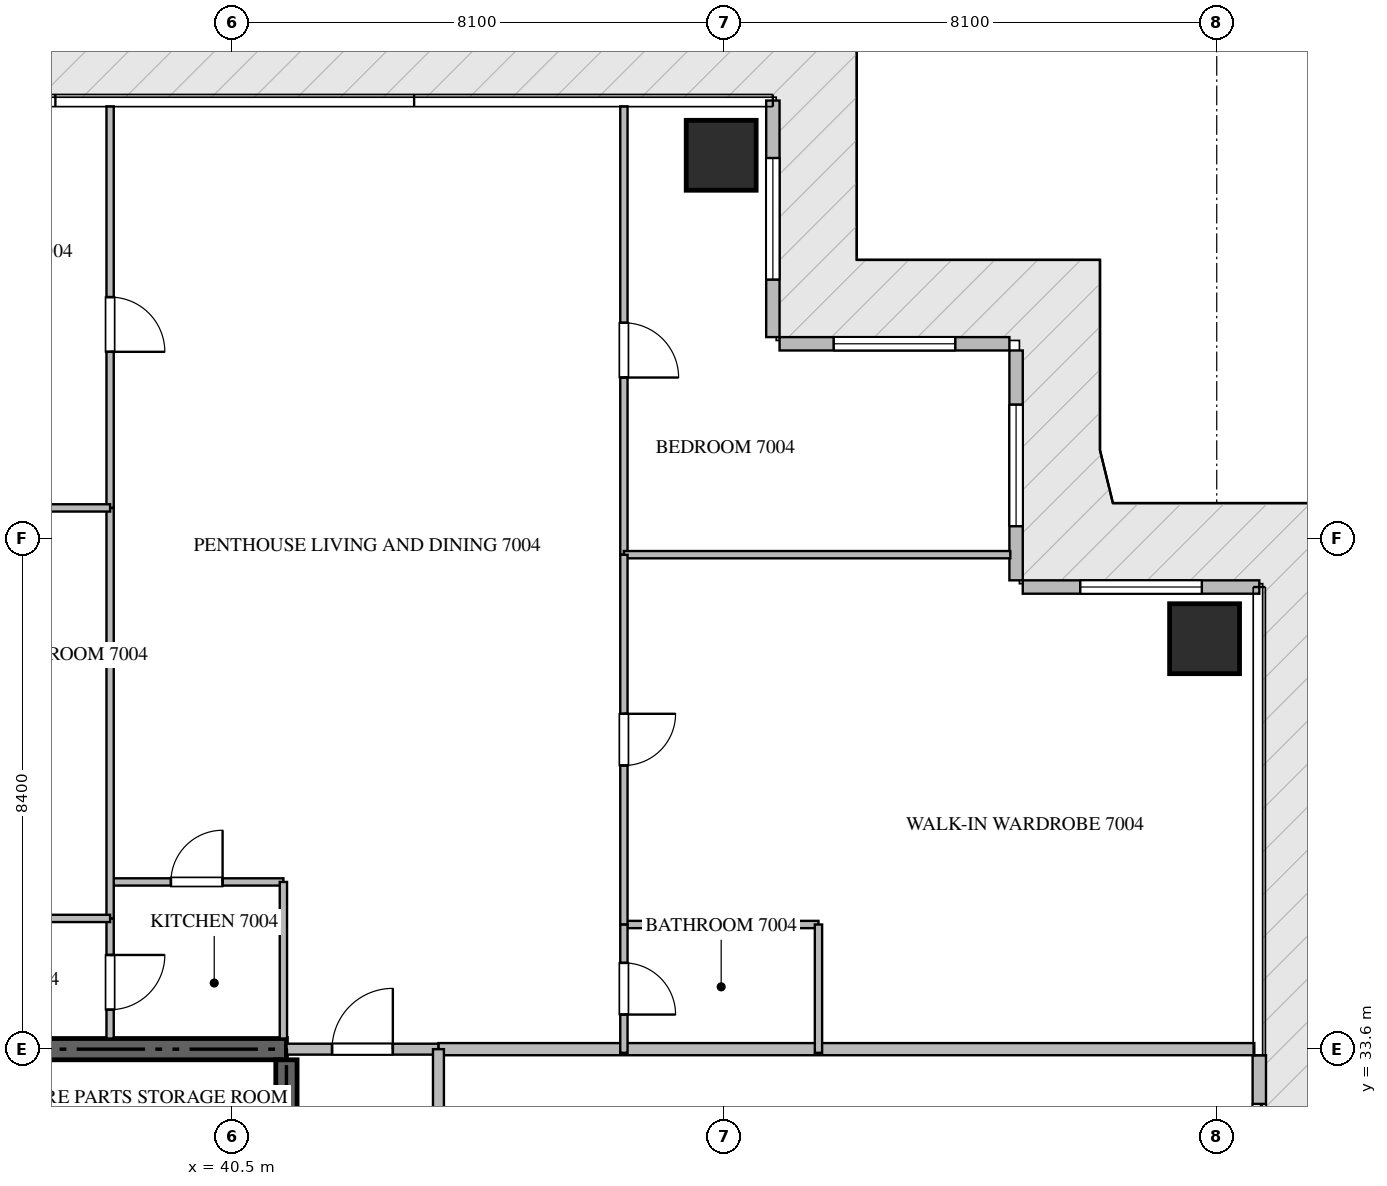
"""IFC4 building model, lengths in metres.
Left out: names, types, materials, properties, quantities, classifications, styles, units other than length and angle.
Written with IfcOpenShell. Run it as: python <this file> out.ifc"""

import sys

from ifc_helpers import new_model, si_unit, direction, frame, frame_2d, origin, origin_2d, place, context, subcontext, project, spatial, rectangle, extrude, source, transform, mapped, element, fill, save


model = new_model("IFC4")
c1 = context("Model", 3, precision=1e-05, world=origin(), true_north=direction((0.0, 1.0)))
c2 = subcontext(c1, "Body", "Model", "MODEL_VIEW")
j1 = project(units=[si_unit("LENGTHUNIT", "METRE"), si_unit("PLANEANGLEUNIT", "RADIAN")], contexts=[c1])
p1 = place(None, origin())
s1 = spatial("IfcSite", under=j1, at=p1, CompositionType="ELEMENT")
p2 = place(p1, origin())
s2 = spatial("IfcBuilding", under=s1, at=p2, CompositionType="ELEMENT")
p3 = place(p2, frame((0.0, 0.0, 279.75)))
s3 = spatial("IfcBuildingStorey", under=s2, at=p3, CompositionType="ELEMENT", Elevation=279.75)
p4 = place(p3, frame((41.4, 33.6, -0.26), z_axis=(0.0, 0.0, 1.0), x_axis=(-1.0, 0.0, 0.0)))
e1 = element("IfcWall", 1, at=p4, inside=s3, PredefinedType="SHEAR", context=c2, shape_type="SweptSolid", body=[
    extrude(rectangle(XDim=18.0, YDim=0.35, at=frame_2d((9.0, 0.0))), origin(), (0.0, 0.0, 1.0), 3.848),
])
p5 = place(p3, frame((41.4, 27.75, -0.26), z_axis=(0.0, 0.0, 1.0), x_axis=(0.0, 1.0, 0.0)))
e2 = element("IfcWall", 2, at=p5, inside=s3, PredefinedType="SHEAR", context=c2, shape_type="SweptSolid", body=[
    extrude(rectangle(XDim=5.675, YDim=0.35, at=frame_2d((2.837, 0.0))), origin(), (0.0, 0.0, 1.0), 3.848),
])
m1 = source(origin(), c2, "Body", "SweptSolid", [
    extrude(rectangle(XDim=1.15, YDim=1.15, at=origin_2d()), origin(), (0.0, 0.0, 1.0), 3.85),
])
for number, where, z_axis, x_axis in (
    (3, (48.55, 48.3, -0.26), (0.0, 0.0, 1.0), (1.0, 0.0, 0.0)),
    (4, (56.5, 40.35, -0.26), (0.0, 0.0, 1.0), (1.0, 0.0, 0.0)),
):
    element("IfcColumn", number, at=place(p3, frame(where, z_axis=z_axis, x_axis=x_axis)), inside=s3, PredefinedType="COLUMN", context=c2, shape_type="MappedRepresentation", body=[
        mapped(m1, transform((0.0, 0.0, 0.0), scale=1.0)),
    ])
p6 = place(p3, frame((57.4, 30.5, 0.0), z_axis=(0.0, 0.0, 1.0), x_axis=(0.0, 1.0, 0.0)))
e5 = element("IfcWall", 5, at=p6, inside=s3, PredefinedType="ELEMENTEDWALL", context=c2, shape_type="SweptSolid", body=[
    extrude(rectangle(XDim=3.0, YDim=0.22, at=frame_2d((1.5, 0.0))), origin(), (0.0, 0.0, 1.0), 3.575),
])
p7 = place(p6, frame((0.8, 0.0, 0.0)))
e6 = element("IfcOpeningElement", 6, at=p7, cuts=e5, PredefinedType="OPENING", context=c2, shape_type="SweptSolid", body=[
    extrude(rectangle(XDim=1.4, YDim=2.25, at=frame_2d((0.7, 1.125))), frame((0.0, 0.12, 0.0), z_axis=(0.0, -1.0, 0.0), x_axis=(1.0, 0.0, 0.0)), (0.0, 0.0, 1.0), 0.24),
])
p8 = place(p3, frame((57.4, 41.2, 0.0), z_axis=(0.0, 0.0, 1.0), x_axis=(-1.0, 0.0, 0.0)))
e7 = element("IfcWall", 7, at=p8, inside=s3, PredefinedType="ELEMENTEDWALL", context=c2, shape_type="SweptSolid", body=[
    extrude(rectangle(XDim=3.89, YDim=0.22, at=frame_2d((1.945, 0.0))), origin(), (0.0, 0.0, 1.0), 3.575),
])
p9 = place(p8, frame((0.945, 0.0, 0.65)))
e8 = element("IfcOpeningElement", 8, at=p9, cuts=e7, PredefinedType="OPENING", context=c2, shape_type="SweptSolid", body=[
    extrude(rectangle(XDim=2.0, YDim=2.2, at=frame_2d((1.0, 1.1))), frame((0.0, 0.12, 0.0), z_axis=(0.0, -1.0, 0.0), x_axis=(1.0, 0.0, 0.0)), (0.0, 0.0, 1.0), 0.24),
])
p10 = place(p3, frame((53.4, 41.31, 0.0), z_axis=(0.0, 0.0, 1.0), x_axis=(0.0, 1.0, 0.0)))
e9 = element("IfcWall", 9, at=p10, inside=s3, PredefinedType="ELEMENTEDWALL", context=c2, shape_type="SweptSolid", body=[
    extrude(rectangle(XDim=3.78, YDim=0.22, at=frame_2d((1.89, 0.0))), origin(), (0.0, 0.0, 1.0), 3.575),
])
p11 = place(p10, frame((0.89, 0.0, 0.65)))
e10 = element("IfcOpeningElement", 10, at=p11, cuts=e9, PredefinedType="OPENING", context=c2, shape_type="SweptSolid", body=[
    extrude(rectangle(XDim=2.0, YDim=2.2, at=frame_2d((1.0, 1.1))), frame((0.0, 0.12, 0.0), z_axis=(0.0, -1.0, 0.0), x_axis=(1.0, 0.0, 0.0)), (0.0, 0.0, 1.0), 0.24),
])
p12 = place(p3, frame((53.29, 45.2, 0.0), z_axis=(0.0, 0.0, 1.0), x_axis=(-1.0, 0.0, 0.0)))
e11 = element("IfcWall", 11, at=p12, inside=s3, PredefinedType="ELEMENTEDWALL", context=c2, shape_type="SweptSolid", body=[
    extrude(rectangle(XDim=3.78, YDim=0.22, at=frame_2d((1.89, 0.0))), origin(), (0.0, 0.0, 1.0), 3.575),
])
p13 = place(p12, frame((0.89, 0.0, 0.65)))
e12 = element("IfcOpeningElement", 12, at=p13, cuts=e11, PredefinedType="OPENING", context=c2, shape_type="SweptSolid", body=[
    extrude(rectangle(XDim=2.0, YDim=2.2, at=frame_2d((1.0, 1.1))), frame((0.0, 0.12, 0.0), z_axis=(0.0, -1.0, 0.0), x_axis=(1.0, 0.0, 0.0)), (0.0, 0.0, 1.0), 0.24),
])
p14 = place(p3, frame((49.4, 45.31, 0.0), z_axis=(0.0, 0.0, 1.0), x_axis=(0.0, 1.0, 0.0)))
e13 = element("IfcWall", 13, at=p14, inside=s3, PredefinedType="ELEMENTEDWALL", context=c2, shape_type="SweptSolid", body=[
    extrude(rectangle(XDim=3.89, YDim=0.22, at=frame_2d((1.945, 0.0))), origin(), (0.0, 0.0, 1.0), 3.575),
])
p15 = place(p14, frame((0.945, 0.0, 0.65)))
e14 = element("IfcOpeningElement", 14, at=p15, cuts=e13, PredefinedType="OPENING", context=c2, shape_type="SweptSolid", body=[
    extrude(rectangle(XDim=2.0, YDim=2.2, at=frame_2d((1.0, 1.1))), frame((0.0, 0.12, 0.0), z_axis=(0.0, -1.0, 0.0), x_axis=(1.0, 0.0, 0.0)), (0.0, 0.0, 1.0), 0.24),
])
p16 = place(p3, frame((43.9, 33.6, 0.0), z_axis=(0.0, 0.0, 1.0), x_axis=(1.0, 0.0, 0.0)))
e15 = element("IfcWall", 15, at=p16, inside=s3, PredefinedType="PARTITIONING", context=c2, shape_type="SweptSolid", body=[
    extrude(rectangle(XDim=13.418, YDim=0.2, at=frame_2d((6.709, 0.0))), origin(), (0.0, 0.0, 1.0), 3.59),
])
p17 = place(p3, frame((41.402, 33.6, 0.0), z_axis=(0.0, 0.0, 1.0), x_axis=(1.0, 0.0, 0.0)))
e16 = element("IfcWall", 16, at=p17, inside=s3, PredefinedType="PARTITIONING", context=c2, shape_type="SweptSolid", body=[
    extrude(rectangle(XDim=2.496, YDim=0.18, at=frame_2d((1.248, 0.0))), origin(), (0.0, 0.0, 1.0), 3.59),
])
p18 = place(p17, frame((0.748, 0.0, 0.0)))
e17 = element("IfcOpeningElement", 17, at=p18, cuts=e16, PredefinedType="OPENING", context=c2, shape_type="SweptSolid", body=[
    extrude(rectangle(XDim=1.0, YDim=2.15, at=frame_2d((0.5, 1.075))), frame((0.0, 0.1, 0.0), z_axis=(0.0, -1.0, 0.0), x_axis=(1.0, 0.0, 0.0)), (0.0, 0.0, 1.0), 0.2),
])
p19 = place(p3, frame((43.9, 16.8, 0.0), z_axis=(0.0, 0.0, 1.0), x_axis=(0.0, 1.0, 0.0)))
e18 = element("IfcWall", 18, at=p19, inside=s3, PredefinedType="PARTITIONING", context=c2, shape_type="SweptSolid", body=[
    extrude(rectangle(XDim=16.8, YDim=0.18, at=frame_2d((8.4, 0.0))), origin(), (0.0, 0.0, 1.0), 3.59),
])
p20 = place(p19, frame((4.898, 0.0, 0.0)))
e19 = element("IfcOpeningElement", 19, at=p20, cuts=e18, PredefinedType="OPENING", context=c2, shape_type="SweptSolid", body=[
    extrude(rectangle(XDim=1.0, YDim=2.15, at=frame_2d((0.5, 1.075))), frame((0.0, 0.1, 0.0), z_axis=(0.0, -1.0, 0.0), x_axis=(1.0, 0.0, 0.0)), (0.0, 0.0, 1.0), 0.2),
])
p21 = place(p19, frame((13.335, 0.0, 0.0)))
e20 = element("IfcOpeningElement", 20, at=p21, cuts=e18, PredefinedType="OPENING", context=c2, shape_type="SweptSolid", body=[
    extrude(rectangle(XDim=1.0, YDim=2.15, at=frame_2d((0.5, 1.075))), frame((0.0, 0.1, 0.0), z_axis=(0.0, -1.0, 0.0), x_axis=(1.0, 0.0, 0.0)), (0.0, 0.0, 1.0), 0.2),
])
p22 = place(p3, frame((38.5, 36.35, 0.0), z_axis=(0.0, 0.0, 1.0), x_axis=(1.0, 0.0, 0.0)))
e21 = element("IfcWall", 21, at=p22, inside=s3, PredefinedType="PARTITIONING", context=c2, shape_type="SweptSolid", body=[
    extrude(rectangle(XDim=2.85, YDim=0.12, at=frame_2d((1.425, 0.0))), origin(), (0.0, 0.0, 1.0), 3.59),
])
p23 = place(p22, frame((1.0, 0.0, 0.0)))
e22 = element("IfcOpeningElement", 22, at=p23, cuts=e21, PredefinedType="OPENING", context=c2, shape_type="SweptSolid", body=[
    extrude(rectangle(XDim=0.85, YDim=2.1, at=frame_2d((0.425, 1.05))), frame((0.0, 0.07, 0.0), z_axis=(0.0, -1.0, 0.0), x_axis=(1.0, 0.0, 0.0)), (0.0, 0.0, 1.0), 0.14),
])
p24 = place(p3, frame((41.35, 36.35, 0.0), z_axis=(0.0, 0.0, 1.0), x_axis=(0.0, -1.0, 0.0)))
e23 = element("IfcWall", 23, at=p24, inside=s3, PredefinedType="PARTITIONING", context=c2, shape_type="SweptSolid", body=[
    extrude(rectangle(XDim=2.575, YDim=0.12, at=frame_2d((1.288, 0.0))), origin(), (0.0, 0.0, 1.0), 3.59),
])
p25 = place(p3, frame((38.5, 35.75, 0.0), z_axis=(0.0, 0.0, 1.0), x_axis=(0.0, -1.0, 0.0)))
e24 = element("IfcWall", 24, at=p25, inside=s3, PredefinedType="PARTITIONING", context=c2, shape_type="SweptSolid", body=[
    extrude(rectangle(XDim=1.975, YDim=0.12, at=frame_2d((0.988, 0.0))), origin(), (0.0, 0.0, 1.0), 3.59),
])
p26 = place(p25, frame((0.601, 0.0, 0.0)))
e25 = element("IfcOpeningElement", 25, at=p26, cuts=e24, PredefinedType="OPENING", context=c2, shape_type="SweptSolid", body=[
    extrude(rectangle(XDim=0.9, YDim=2.1, at=frame_2d((0.45, 1.05))), frame((0.0, 0.07, 0.0), z_axis=(0.0, -1.0, 0.0), x_axis=(1.0, 0.0, 0.0)), (0.0, 0.0, 1.0), 0.14),
])
p27 = place(p3, frame((38.5, 49.105, 0.0), z_axis=(0.0, 0.0, 1.0), x_axis=(0.0, -1.0, 0.0)))
e26 = element("IfcWall", 26, at=p27, inside=s3, PredefinedType="PARTITIONING", context=c2, shape_type="SweptSolid", body=[
    extrude(rectangle(XDim=6.604, YDim=0.12, at=frame_2d((3.302, 0.0))), origin(), (0.0, 0.0, 1.0), 3.59),
])
p28 = place(p27, frame((3.137, 0.0, 0.0)))
e27 = element("IfcOpeningElement", 27, at=p28, cuts=e26, PredefinedType="OPENING", context=c2, shape_type="SweptSolid", body=[
    extrude(rectangle(XDim=0.9, YDim=2.1, at=frame_2d((0.45, 1.05))), frame((0.0, 0.07, 0.0), z_axis=(0.0, -1.0, 0.0), x_axis=(1.0, 0.0, 0.0)), (0.0, 0.0, 1.0), 0.14),
])
p29 = place(p3, frame((38.5, 42.499, 0.0), z_axis=(0.0, 0.0, 1.0), x_axis=(0.0, -1.0, 0.0)))
e28 = element("IfcWall", 28, at=p29, inside=s3, PredefinedType="PARTITIONING", context=c2, shape_type="SweptSolid", body=[
    extrude(rectangle(XDim=6.747, YDim=0.12, at=frame_2d((3.374, 0.0))), origin(), (0.0, 0.0, 1.0), 3.59),
])
p30 = place(p3, frame((33.38, 42.501, 0.0), z_axis=(0.0, 0.0, 1.0), x_axis=(1.0, 0.0, 0.0)))
e29 = element("IfcWall", 29, at=p30, inside=s3, PredefinedType="PARTITIONING", context=c2, shape_type="SweptSolid", body=[
    extrude(rectangle(XDim=5.12, YDim=0.12, at=frame_2d((2.56, 0.0))), origin(), (0.0, 0.0, 1.0), 3.59),
])
p31 = place(p3, frame((35.482, 35.75, 0.0), z_axis=(0.0, 0.0, 1.0), x_axis=(1.0, 0.0, 0.0)))
e30 = element("IfcWall", 30, at=p31, inside=s3, PredefinedType="PARTITIONING", context=c2, shape_type="SweptSolid", body=[
    extrude(rectangle(XDim=3.018, YDim=0.12, at=frame_2d((1.509, 0.0))), origin(), (0.0, 0.0, 1.0), 3.59),
])
p32 = place(p31, frame((1.084, 0.0, 0.0)))
e31 = element("IfcOpeningElement", 31, at=p32, cuts=e30, PredefinedType="OPENING", context=c2, shape_type="SweptSolid", body=[
    extrude(rectangle(XDim=0.85, YDim=2.1, at=frame_2d((0.425, 1.05))), frame((0.0, 0.07, 0.0), z_axis=(0.0, -1.0, 0.0), x_axis=(1.0, 0.0, 0.0)), (0.0, 0.0, 1.0), 0.14),
])
p33 = place(p3, frame((46.95, 49.105, 0.0), z_axis=(0.0, 0.0, 1.0), x_axis=(0.0, -1.0, 0.0)))
e32 = element("IfcWall", 32, at=p33, inside=s3, PredefinedType="PARTITIONING", context=c2, shape_type="SweptSolid", body=[
    extrude(rectangle(XDim=7.373, YDim=0.12, at=frame_2d((3.687, 0.0))), origin(), (0.0, 0.0, 1.0), 3.59),
])
p34 = place(p33, frame((3.56, 0.0, 0.0)))
e33 = element("IfcOpeningElement", 33, at=p34, cuts=e32, PredefinedType="OPENING", context=c2, shape_type="SweptSolid", body=[
    extrude(rectangle(XDim=0.9, YDim=2.1, at=frame_2d((0.45, 1.05))), frame((0.0, 0.07, 0.0), z_axis=(0.0, -1.0, 0.0), x_axis=(1.0, 0.0, 0.0)), (0.0, 0.0, 1.0), 0.14),
])
p35 = place(p3, frame((46.95, 41.732, 0.0), z_axis=(0.0, 0.0, 1.0), x_axis=(1.0, 0.0, 0.0)))
e34 = element("IfcWall", 34, at=p35, inside=s3, PredefinedType="PARTITIONING", context=c2, shape_type="SweptSolid", body=[
    extrude(rectangle(XDim=6.355, YDim=0.12, at=frame_2d((3.177, 0.0))), origin(), (0.0, 0.0, 1.0), 3.59),
])
p36 = place(p3, frame((46.95, 35.65, 0.0), z_axis=(0.0, 0.0, 1.0), x_axis=(1.0, 0.0, 0.0)))
e35 = element("IfcWall", 35, at=p36, inside=s3, PredefinedType="PARTITIONING", context=c2, shape_type="SweptSolid", body=[
    extrude(rectangle(XDim=3.2, YDim=0.12, at=frame_2d((1.6, 0.0))), origin(), (0.0, 0.0, 1.0), 3.59),
])
p37 = place(p3, frame((50.15, 35.65, 0.0), z_axis=(0.0, 0.0, 1.0), x_axis=(0.0, -1.0, 0.0)))
e36 = element("IfcWall", 36, at=p37, inside=s3, PredefinedType="PARTITIONING", context=c2, shape_type="SweptSolid", body=[
    extrude(rectangle(XDim=2.11, YDim=0.12, at=frame_2d((1.055, 0.0))), origin(), (0.0, 0.0, 1.0), 3.59),
])
p38 = place(p3, frame((46.95, 41.73, 0.0), z_axis=(0.0, 0.0, 1.0), x_axis=(0.0, -1.0, 0.0)))
e37 = element("IfcWall", 37, at=p38, inside=s3, PredefinedType="PARTITIONING", context=c2, shape_type="SweptSolid", body=[
    extrude(rectangle(XDim=6.08, YDim=0.12, at=frame_2d((3.04, 0.0))), origin(), (0.0, 0.0, 1.0), 3.59),
])
p39 = place(p38, frame((2.615, 0.0, 0.0)))
e38 = element("IfcOpeningElement", 38, at=p39, cuts=e37, PredefinedType="OPENING", context=c2, shape_type="SweptSolid", body=[
    extrude(rectangle(XDim=0.85, YDim=2.1, at=frame_2d((0.425, 1.05))), frame((0.0, 0.07, 0.0), z_axis=(0.0, -1.0, 0.0), x_axis=(1.0, 0.0, 0.0)), (0.0, 0.0, 1.0), 0.14),
])
p40 = place(p3, frame((46.95, 35.648, 0.0), z_axis=(0.0, 0.0, 1.0), x_axis=(0.0, -1.0, 0.0)))
e39 = element("IfcWall", 39, at=p40, inside=s3, PredefinedType="PARTITIONING", context=c2, shape_type="SweptSolid", body=[
    extrude(rectangle(XDim=2.108, YDim=0.12, at=frame_2d((1.054, 0.0))), origin(), (0.0, 0.0, 1.0), 3.59),
])
p41 = place(p40, frame((0.629, 0.0, 0.0)))
e40 = element("IfcOpeningElement", 40, at=p41, cuts=e39, PredefinedType="OPENING", context=c2, shape_type="SweptSolid", body=[
    extrude(rectangle(XDim=0.85, YDim=2.1, at=frame_2d((0.425, 1.05))), frame((0.0, 0.07, 0.0), z_axis=(0.0, -1.0, 0.0), x_axis=(1.0, 0.0, 0.0)), (0.0, 0.0, 1.0), 0.14),
])
m2 = source(origin(), c2, "Body", "SweptSolid", [
    extrude(rectangle(XDim=1.4, YDim=2.25, at=frame_2d((0.7, 1.125))), frame((0.0, 0.025, 0.0), z_axis=(0.0, -1.0, 0.0), x_axis=(1.0, 0.0, 0.0)), (0.0, 0.0, 1.0), 0.05),
])
p42 = place(p7, origin())
e41 = element("IfcDoor", 41, at=p42, inside=s3, OperationType="SLIDING_TO_LEFT", PredefinedType="DOOR", context=c2, shape_type="MappedRepresentation", body=[
    mapped(m2, transform((0.0, 0.0, 0.0), scale=1.0)),
])
fill(e6, e41)
m3 = source(origin(), c2, "Body", "SweptSolid", [
    extrude(rectangle(XDim=2.0, YDim=2.2, at=frame_2d((1.0, 1.1))), frame((0.0, 0.03, 0.0), z_axis=(0.0, -1.0, 0.0), x_axis=(1.0, 0.0, 0.0)), (0.0, 0.0, 1.0), 0.06),
])
p43 = place(p9, origin())
e42 = element("IfcWindow", 42, at=p43, inside=s3, PartitioningType="SINGLE_PANEL", PredefinedType="WINDOW", context=c2, shape_type="MappedRepresentation", body=[
    mapped(m3, transform((0.0, 0.0, 0.0), scale=1.0)),
])
fill(e8, e42)
p44 = place(p11, origin())
e43 = element("IfcWindow", 43, at=p44, inside=s3, PartitioningType="SINGLE_PANEL", PredefinedType="WINDOW", context=c2, shape_type="MappedRepresentation", body=[
    mapped(m3, transform((0.0, 0.0, 0.0), scale=1.0)),
])
fill(e10, e43)
p45 = place(p13, origin())
e44 = element("IfcWindow", 44, at=p45, inside=s3, PartitioningType="SINGLE_PANEL", PredefinedType="WINDOW", context=c2, shape_type="MappedRepresentation", body=[
    mapped(m3, transform((0.0, 0.0, 0.0), scale=1.0)),
])
fill(e12, e44)
p46 = place(p15, origin())
e45 = element("IfcWindow", 45, at=p46, inside=s3, PartitioningType="SINGLE_PANEL", PredefinedType="WINDOW", context=c2, shape_type="MappedRepresentation", body=[
    mapped(m3, transform((0.0, 0.0, 0.0), scale=1.0)),
])
fill(e14, e45)
m4 = source(origin(), c2, "Body", "SweptSolid", [
    extrude(rectangle(XDim=1.0, YDim=2.15, at=frame_2d((0.5, 1.075))), frame((0.0, 0.025, 0.0), z_axis=(0.0, -1.0, 0.0), x_axis=(1.0, 0.0, 0.0)), (0.0, 0.0, 1.0), 0.05),
])
p47 = place(p18, origin())
e46 = element("IfcDoor", 46, at=p47, inside=s3, OperationType="SINGLE_SWING_RIGHT", PredefinedType="DOOR", context=c2, shape_type="MappedRepresentation", body=[
    mapped(m4, transform((0.0, 0.0, 0.0), scale=1.0)),
])
fill(e17, e46)
m5 = source(origin(), c2, "Body", "SweptSolid", [
    extrude(rectangle(XDim=0.85, YDim=2.1, at=frame_2d((0.425, 1.05))), frame((0.0, 0.025, 0.0), z_axis=(0.0, -1.0, 0.0), x_axis=(1.0, 0.0, 0.0)), (0.0, 0.0, 1.0), 0.05),
])
p48 = place(p23, origin())
e47 = element("IfcDoor", 47, at=p48, inside=s3, OperationType="SINGLE_SWING_RIGHT", PredefinedType="DOOR", context=c2, shape_type="MappedRepresentation", body=[
    mapped(m5, transform((0.0, 0.0, 0.0), scale=1.0)),
])
fill(e22, e47)
m6 = source(origin(), c2, "Body", "SweptSolid", [
    extrude(rectangle(XDim=0.9, YDim=2.1, at=frame_2d((0.45, 1.05))), frame((0.0, 0.025, 0.0), z_axis=(0.0, -1.0, 0.0), x_axis=(1.0, 0.0, 0.0)), (0.0, 0.0, 1.0), 0.05),
])
p49 = place(p26, origin())
e48 = element("IfcDoor", 48, at=p49, inside=s3, OperationType="SINGLE_SWING_LEFT", PredefinedType="DOOR", context=c2, shape_type="MappedRepresentation", body=[
    mapped(m6, transform((0.0, 0.0, 0.0), scale=1.0)),
])
fill(e25, e48)
p50 = place(p28, origin())
e49 = element("IfcDoor", 49, at=p50, inside=s3, OperationType="SINGLE_SWING_RIGHT", PredefinedType="DOOR", context=c2, shape_type="MappedRepresentation", body=[
    mapped(m6, transform((0.0, 0.0, 0.0), scale=1.0)),
])
fill(e27, e49)
p51 = place(p34, origin())
e50 = element("IfcDoor", 50, at=p51, inside=s3, OperationType="SINGLE_SWING_RIGHT", PredefinedType="DOOR", context=c2, shape_type="MappedRepresentation", body=[
    mapped(m6, transform((0.0, 0.0, 0.0), scale=1.0)),
])
fill(e33, e50)
p52 = place(p39, origin())
e51 = element("IfcDoor", 51, at=p52, inside=s3, OperationType="SINGLE_SWING_LEFT", PredefinedType="DOOR", context=c2, shape_type="MappedRepresentation", body=[
    mapped(m5, transform((0.0, 0.0, 0.0), scale=1.0)),
])
fill(e38, e51)
p53 = place(p41, origin())
e52 = element("IfcDoor", 52, at=p53, inside=s3, OperationType="SINGLE_SWING_RIGHT", PredefinedType="DOOR", context=c2, shape_type="MappedRepresentation", body=[
    mapped(m5, transform((0.0, 0.0, 0.0), scale=1.0)),
])
fill(e40, e52)
save(model, sys.argv[1])
